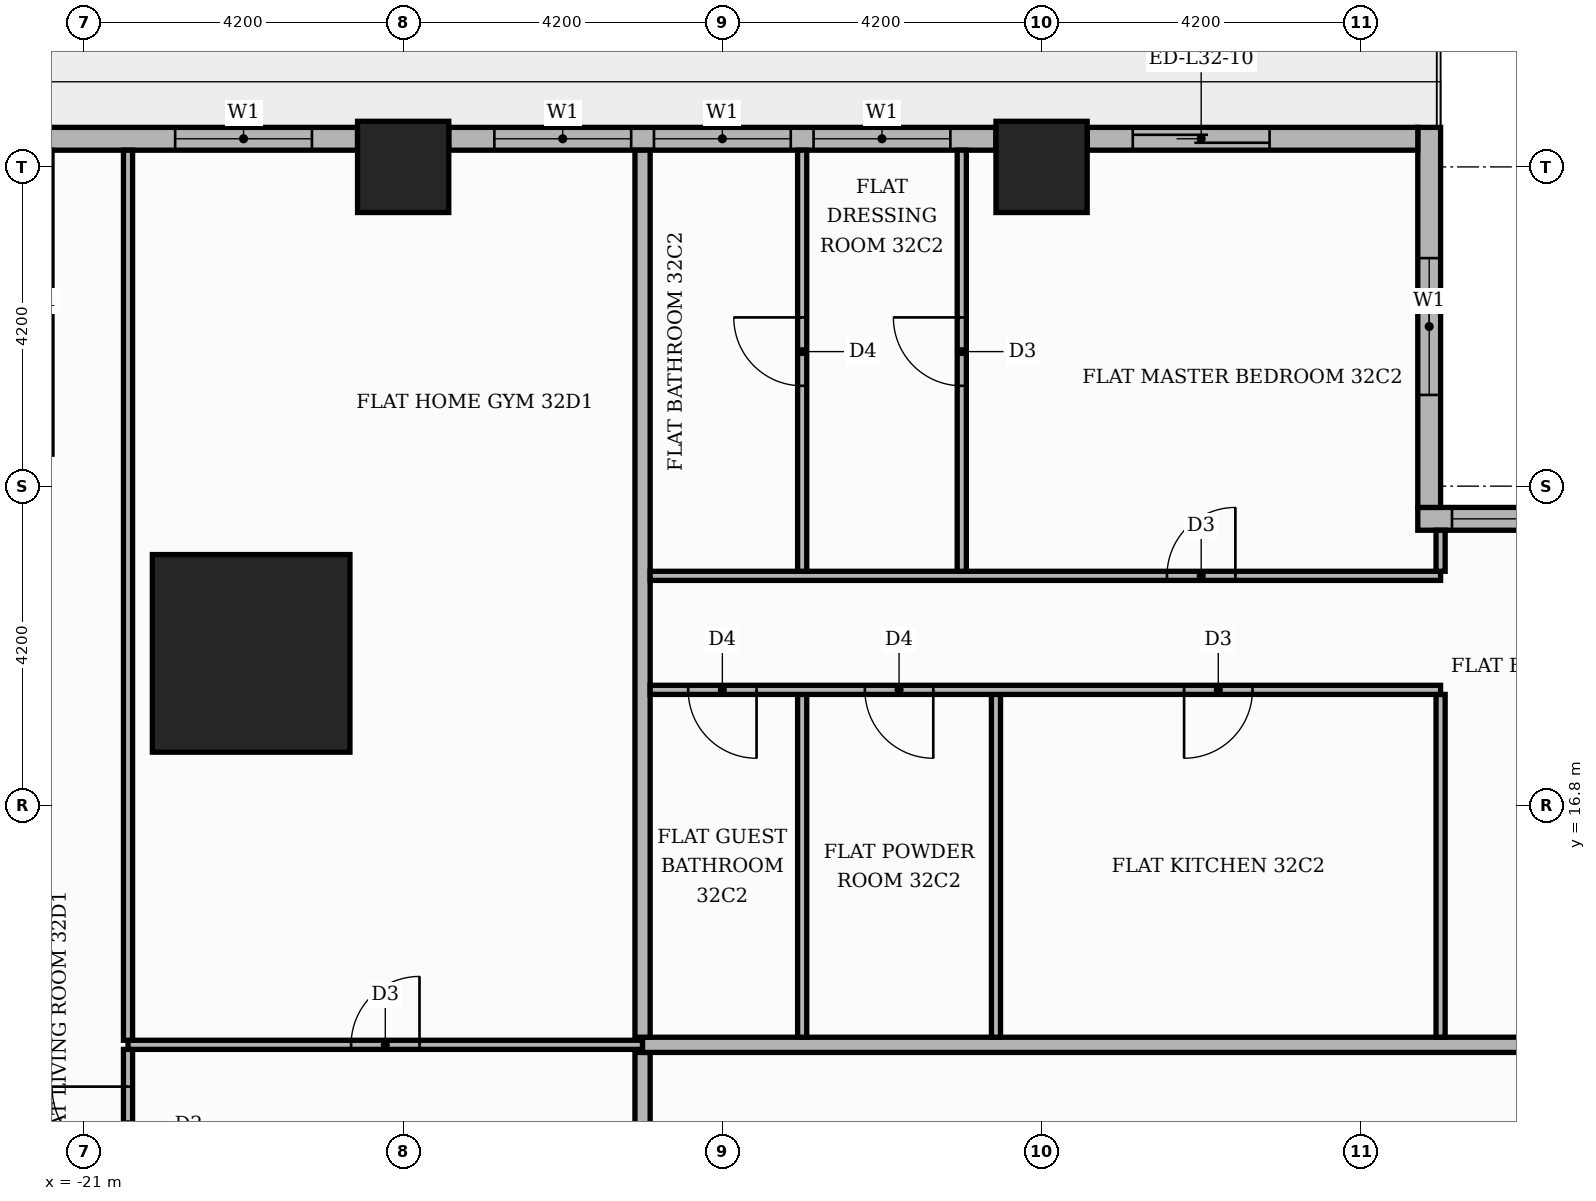
"""IFC4 building model, lengths in metres.
Left out: names, types, materials, properties, quantities, classifications, styles, units other than length and angle.
Written with IfcOpenShell. Run it as: python <this file> out.ifc"""

import sys

from ifc_helpers import new_model, si_unit, direction, frame, frame_2d, origin, origin_2d, place, context, subcontext, project, spatial, rectangle, extrude, element, fill, save


model = new_model("IFC4")
c1 = context("Model", 3, precision=1e-05, world=origin(), true_north=direction((0.0, 1.0)))
c2 = subcontext(c1, "Body", "Model", "MODEL_VIEW")
j1 = project(units=[si_unit("LENGTHUNIT", "METRE"), si_unit("PLANEANGLEUNIT", "RADIAN")], contexts=[c1])
p1 = place(None, origin())
s1 = spatial("IfcSite", under=j1, at=p1, CompositionType="ELEMENT")
p2 = place(p1, origin())
s2 = spatial("IfcBuilding", under=s1, at=p2, CompositionType="ELEMENT")
p3 = place(p2, frame((0.0, 0.0, 137.7)))
s3 = spatial("IfcBuildingStorey", under=s2, at=p3, CompositionType="ELEMENT", Elevation=137.7)
p4 = place(p3, frame((-18.8, 18.8, 0.0), z_axis=(0.0, 0.0, 1.0), x_axis=(1.0, 0.0, 0.0)))
e1 = element("IfcColumn", 1, at=p4, inside=s3, PredefinedType="COLUMN", context=c2, shape_type="SweptSolid", body=[
    extrude(rectangle(XDim=2.6, YDim=2.6, at=origin_2d()), origin(), (0.0, 0.0, 1.0), 3.9),
])
for number, where, z_axis, x_axis in (
    (2, (-8.4, 25.2, 0.0), (0.0, 0.0, 1.0), (1.0, 0.0, 0.0)),
    (3, (-16.8, 25.2, 0.0), (0.0, 0.0, 1.0), (1.0, 0.0, 0.0)),
):
    element("IfcColumn", number, at=place(p3, frame(where, z_axis=z_axis, x_axis=x_axis)), inside=s3, PredefinedType="COLUMN", context=c2, shape_type="SweptSolid", body=[
        extrude(rectangle(XDim=1.2, YDim=1.2, at=origin_2d()), origin(), (0.0, 0.0, 1.0), 3.9),
    ])
p5 = place(p3, frame((3.15, 20.57, 0.0), z_axis=(0.0, 0.0, 1.0), x_axis=(-1.0, 0.0, 0.0)))
e4 = element("IfcWall", 4, at=p5, inside=s3, PredefinedType="STANDARD", context=c2, shape_type="SweptSolid", body=[
    extrude(rectangle(XDim=6.6, YDim=0.3, at=frame_2d((3.3, 0.0))), origin(), (0.0, 0.0, 1.0), 3.48),
])
p6 = place(p5, frame((0.15, 0.0, 0.9)))
e5 = element("IfcOpeningElement", 5, at=p6, cuts=e4, PredefinedType="OPENING", context=c2, shape_type="SweptSolid", body=[
    extrude(rectangle(XDim=6.0, YDim=2.1, at=frame_2d((3.0, 1.05))), frame((0.0, 0.16, 0.0), z_axis=(0.0, -1.0, 0.0), x_axis=(1.0, 0.0, 0.0)), (0.0, 0.0, 1.0), 0.32),
])
p7 = place(p3, frame((-3.3, 20.72, 0.0), z_axis=(0.0, 0.0, 1.0), x_axis=(0.0, 1.0, 0.0)))
e6 = element("IfcWall", 6, at=p7, inside=s3, PredefinedType="STANDARD", context=c2, shape_type="SweptSolid", body=[
    extrude(rectangle(XDim=5.0, YDim=0.3, at=frame_2d((2.5, 0.0))), origin(), (0.0, 0.0, 1.0), 3.48),
])
p8 = place(p7, frame((1.48, 0.0, 0.9)))
e7 = element("IfcOpeningElement", 7, at=p8, cuts=e6, PredefinedType="OPENING", context=c2, shape_type="SweptSolid", body=[
    extrude(rectangle(XDim=1.8, YDim=2.1, at=frame_2d((0.9, 1.05))), frame((0.0, 0.16, 0.0), z_axis=(0.0, -1.0, 0.0), x_axis=(1.0, 0.0, 0.0)), (0.0, 0.0, 1.0), 0.32),
])
p9 = place(p3, frame((-3.45, 25.57, 0.0), z_axis=(0.0, 0.0, 1.0), x_axis=(-1.0, 0.0, 0.0)))
e8 = element("IfcWall", 8, at=p9, inside=s3, PredefinedType="STANDARD", context=c2, shape_type="SweptSolid", body=[
    extrude(rectangle(XDim=4.35, YDim=0.3, at=frame_2d((2.175, 0.0))), origin(), (0.0, 0.0, 1.0), 3.48),
])
p10 = place(p9, frame((1.95, 0.0, 0.0)))
e9 = element("IfcOpeningElement", 9, at=p10, cuts=e8, PredefinedType="OPENING", context=c2, shape_type="SweptSolid", body=[
    extrude(rectangle(XDim=1.8, YDim=2.4, at=frame_2d((0.9, 1.2))), frame((0.0, 0.16, 0.0), z_axis=(0.0, -1.0, 0.0), x_axis=(1.0, 0.0, 0.0)), (0.0, 0.0, 1.0), 0.32),
])
p11 = place(p3, frame((-9.0, 25.57, 0.0), z_axis=(0.0, 0.0, 1.0), x_axis=(-1.0, 0.0, 0.0)))
e10 = element("IfcWall", 10, at=p11, inside=s3, PredefinedType="STANDARD", context=c2, shape_type="SweptSolid", body=[
    extrude(rectangle(XDim=7.2, YDim=0.3, at=frame_2d((3.6, 0.0))), origin(), (0.0, 0.0, 1.0), 3.48),
])
p12 = place(p11, frame((0.6, 0.0, 0.9)))
e11 = element("IfcOpeningElement", 11, at=p12, cuts=e10, PredefinedType="OPENING", context=c2, shape_type="SweptSolid", body=[
    extrude(rectangle(XDim=1.8, YDim=2.1, at=frame_2d((0.9, 1.05))), frame((0.0, 0.16, 0.0), z_axis=(0.0, -1.0, 0.0), x_axis=(1.0, 0.0, 0.0)), (0.0, 0.0, 1.0), 0.32),
])
p13 = place(p11, frame((2.7, 0.0, 0.9)))
e12 = element("IfcOpeningElement", 12, at=p13, cuts=e10, PredefinedType="OPENING", context=c2, shape_type="SweptSolid", body=[
    extrude(rectangle(XDim=1.8, YDim=2.1, at=frame_2d((0.9, 1.05))), frame((0.0, 0.16, 0.0), z_axis=(0.0, -1.0, 0.0), x_axis=(1.0, 0.0, 0.0)), (0.0, 0.0, 1.0), 0.32),
])
p14 = place(p11, frame((4.8, 0.0, 0.9)))
e13 = element("IfcOpeningElement", 13, at=p14, cuts=e10, PredefinedType="OPENING", context=c2, shape_type="SweptSolid", body=[
    extrude(rectangle(XDim=1.8, YDim=2.1, at=frame_2d((0.9, 1.05))), frame((0.0, 0.16, 0.0), z_axis=(0.0, -1.0, 0.0), x_axis=(1.0, 0.0, 0.0)), (0.0, 0.0, 1.0), 0.32),
])
p15 = place(p3, frame((-17.4, 25.57, 0.0), z_axis=(0.0, 0.0, 1.0), x_axis=(-1.0, 0.0, 0.0)))
e14 = element("IfcWall", 14, at=p15, inside=s3, PredefinedType="STANDARD", context=c2, shape_type="SweptSolid", body=[
    extrude(rectangle(XDim=4.32, YDim=0.3, at=frame_2d((2.16, 0.0))), origin(), (0.0, 0.0, 1.0), 3.48),
])
p16 = place(p15, frame((0.6, 0.0, 0.9)))
e15 = element("IfcOpeningElement", 15, at=p16, cuts=e14, PredefinedType="OPENING", context=c2, shape_type="SweptSolid", body=[
    extrude(rectangle(XDim=1.8, YDim=2.1, at=frame_2d((0.9, 1.05))), frame((0.0, 0.16, 0.0), z_axis=(0.0, -1.0, 0.0), x_axis=(1.0, 0.0, 0.0)), (0.0, 0.0, 1.0), 0.32),
])
p17 = place(p3, frame((-13.65, 11.1, 0.0), z_axis=(0.0, 0.0, 1.0), x_axis=(0.0, 1.0, 0.0)))
e16 = element("IfcWall", 16, at=p17, inside=s3, PredefinedType="PARTITIONING", context=c2, shape_type="SweptSolid", body=[
    extrude(rectangle(XDim=2.45, YDim=0.2, at=frame_2d((1.225, 0.0))), origin(), (0.0, 0.0, 1.0), 3.48),
])
p18 = place(p3, frame((-20.42, 11.61, 0.0), z_axis=(0.0, 0.0, 1.0), x_axis=(0.0, 1.0, 0.0)))
e17 = element("IfcWall", 17, at=p18, inside=s3, PredefinedType="PARTITIONING", context=c2, shape_type="SweptSolid", body=[
    extrude(rectangle(XDim=1.98, YDim=0.12, at=frame_2d((0.99, 0.0))), origin(), (0.0, 0.0, 1.0), 3.48),
])
p19 = place(p18, frame((0.49, 0.0, 0.0)))
e18 = element("IfcOpeningElement", 18, at=p19, cuts=e17, PredefinedType="OPENING", context=c2, shape_type="SweptSolid", body=[
    extrude(rectangle(XDim=1.0, YDim=2.1, at=frame_2d((0.5, 1.05))), frame((0.0, 0.07, 0.0), z_axis=(0.0, -1.0, 0.0), x_axis=(1.0, 0.0, 0.0)), (0.0, 0.0, 1.0), 0.14),
])
p20 = place(p3, frame((-20.42, 13.65, 0.0), z_axis=(0.0, 0.0, 1.0), x_axis=(1.0, 0.0, 0.0)))
e19 = element("IfcWall", 19, at=p20, inside=s3, PredefinedType="PARTITIONING", context=c2, shape_type="SweptSolid", body=[
    extrude(rectangle(XDim=6.77, YDim=0.12, at=frame_2d((3.385, 0.0))), origin(), (0.0, 0.0, 1.0), 3.48),
])
p21 = place(p20, frame((2.935, 0.0, 0.0)))
e20 = element("IfcOpeningElement", 20, at=p21, cuts=e19, PredefinedType="OPENING", context=c2, shape_type="SweptSolid", body=[
    extrude(rectangle(XDim=0.9, YDim=2.1, at=frame_2d((0.45, 1.05))), frame((0.0, 0.07, 0.0), z_axis=(0.0, -1.0, 0.0), x_axis=(1.0, 0.0, 0.0)), (0.0, 0.0, 1.0), 0.14),
])
p22 = place(p3, frame((-13.65, 13.65, 0.0), z_axis=(0.0, 0.0, 1.0), x_axis=(1.0, 0.0, 0.0)))
e21 = element("IfcWall", 21, at=p22, inside=s3, PredefinedType="PARTITIONING", context=c2, shape_type="SweptSolid", body=[
    extrude(rectangle(XDim=39.07, YDim=0.2, at=frame_2d((19.535, 0.0))), origin(), (0.0, 0.0, 1.0), 3.48),
])
p23 = place(p22, frame((24.65, 0.0, 0.0)))
e22 = element("IfcOpeningElement", 22, at=p23, cuts=e21, PredefinedType="OPENING", context=c2, shape_type="SweptSolid", body=[
    extrude(rectangle(XDim=1.1, YDim=2.4, at=frame_2d((0.55, 1.2))), frame((0.0, 0.11, 0.0), z_axis=(0.0, -1.0, 0.0), x_axis=(1.0, 0.0, 0.0)), (0.0, 0.0, 1.0), 0.22),
])
p24 = place(p22, frame((12.05, 0.0, 0.0)))
e23 = element("IfcOpeningElement", 23, at=p24, cuts=e21, PredefinedType="OPENING", context=c2, shape_type="SweptSolid", body=[
    extrude(rectangle(XDim=1.1, YDim=2.4, at=frame_2d((0.55, 1.2))), frame((0.0, 0.11, 0.0), z_axis=(0.0, -1.0, 0.0), x_axis=(1.0, 0.0, 0.0)), (0.0, 0.0, 1.0), 0.22),
])
p25 = place(p3, frame((-20.42, 13.71, 0.0), z_axis=(0.0, 0.0, 1.0), x_axis=(0.0, 1.0, 0.0)))
e24 = element("IfcWall", 24, at=p25, inside=s3, PredefinedType="PARTITIONING", context=c2, shape_type="SweptSolid", body=[
    extrude(rectangle(XDim=11.71, YDim=0.12, at=frame_2d((5.855, 0.0))), origin(), (0.0, 0.0, 1.0), 3.48),
])
p26 = place(p3, frame((-13.65, 13.75, 0.0), z_axis=(0.0, 0.0, 1.0), x_axis=(0.0, 1.0, 0.0)))
e25 = element("IfcWall", 25, at=p26, inside=s3, PredefinedType="PARTITIONING", context=c2, shape_type="SweptSolid", body=[
    extrude(rectangle(XDim=11.67, YDim=0.2, at=frame_2d((5.835, 0.0))), origin(), (0.0, 0.0, 1.0), 3.48),
])
for number, where, z_axis, x_axis in (
    (26, (-11.55, 13.75, 0.0), (0.0, 0.0, 1.0), (0.0, 1.0, 0.0)),
    (27, (-9.0, 13.75, 0.0), (0.0, 0.0, 1.0), (0.0, 1.0, 0.0)),
    (28, (-3.15, 13.75, 0.0), (0.0, 0.0, 1.0), (0.0, 1.0, 0.0)),
):
    element("IfcWall", number, at=place(p3, frame(where, z_axis=z_axis, x_axis=x_axis)), inside=s3, PredefinedType="PARTITIONING", context=c2, shape_type="SweptSolid", body=[
        extrude(rectangle(XDim=4.51, YDim=0.12, at=frame_2d((2.255, 0.0))), origin(), (0.0, 0.0, 1.0), 3.48),
    ])
p27 = place(p3, frame((-13.55, 18.32, 0.0), z_axis=(0.0, 0.0, 1.0), x_axis=(1.0, 0.0, 0.0)))
e29 = element("IfcWall", 29, at=p27, inside=s3, PredefinedType="PARTITIONING", context=c2, shape_type="SweptSolid", body=[
    extrude(rectangle(XDim=10.4, YDim=0.12, at=frame_2d((5.2, 0.0))), origin(), (0.0, 0.0, 1.0), 3.48),
])
p28 = place(p27, frame((7.025, 0.0, 0.0)))
e30 = element("IfcOpeningElement", 30, at=p28, cuts=e29, PredefinedType="OPENING", context=c2, shape_type="SweptSolid", body=[
    extrude(rectangle(XDim=0.9, YDim=2.1, at=frame_2d((0.45, 1.05))), frame((0.0, 0.07, 0.0), z_axis=(0.0, -1.0, 0.0), x_axis=(1.0, 0.0, 0.0)), (0.0, 0.0, 1.0), 0.14),
])
p29 = place(p27, frame((2.825, 0.0, 0.0)))
e31 = element("IfcOpeningElement", 31, at=p29, cuts=e29, PredefinedType="OPENING", context=c2, shape_type="SweptSolid", body=[
    extrude(rectangle(XDim=0.9, YDim=2.1, at=frame_2d((0.45, 1.05))), frame((0.0, 0.07, 0.0), z_axis=(0.0, -1.0, 0.0), x_axis=(1.0, 0.0, 0.0)), (0.0, 0.0, 1.0), 0.14),
])
p30 = place(p27, frame((0.5, 0.0, 0.0)))
e32 = element("IfcOpeningElement", 32, at=p30, cuts=e29, PredefinedType="OPENING", context=c2, shape_type="SweptSolid", body=[
    extrude(rectangle(XDim=0.9, YDim=2.1, at=frame_2d((0.45, 1.05))), frame((0.0, 0.07, 0.0), z_axis=(0.0, -1.0, 0.0), x_axis=(1.0, 0.0, 0.0)), (0.0, 0.0, 1.0), 0.14),
])
p31 = place(p3, frame((-13.55, 19.82, 0.0), z_axis=(0.0, 0.0, 1.0), x_axis=(1.0, 0.0, 0.0)))
e33 = element("IfcWall", 33, at=p31, inside=s3, PredefinedType="PARTITIONING", context=c2, shape_type="SweptSolid", body=[
    extrude(rectangle(XDim=10.4, YDim=0.12, at=frame_2d((5.2, 0.0))), origin(), (0.0, 0.0, 1.0), 3.48),
])
p32 = place(p31, frame((6.8, 0.0, 0.0)))
e34 = element("IfcOpeningElement", 34, at=p32, cuts=e33, PredefinedType="OPENING", context=c2, shape_type="SweptSolid", body=[
    extrude(rectangle(XDim=0.9, YDim=2.1, at=frame_2d((0.45, 1.05))), frame((0.0, 0.07, 0.0), z_axis=(0.0, -1.0, 0.0), x_axis=(1.0, 0.0, 0.0)), (0.0, 0.0, 1.0), 0.14),
])
p33 = place(p3, frame((-11.55, 19.88, 0.0), z_axis=(0.0, 0.0, 1.0), x_axis=(0.0, 1.0, 0.0)))
e35 = element("IfcWall", 35, at=p33, inside=s3, PredefinedType="PARTITIONING", context=c2, shape_type="SweptSolid", body=[
    extrude(rectangle(XDim=5.54, YDim=0.12, at=frame_2d((2.77, 0.0))), origin(), (0.0, 0.0, 1.0), 3.48),
])
p34 = place(p33, frame((2.44, 0.0, 0.0)))
e36 = element("IfcOpeningElement", 36, at=p34, cuts=e35, PredefinedType="OPENING", context=c2, shape_type="SweptSolid", body=[
    extrude(rectangle(XDim=0.9, YDim=2.1, at=frame_2d((0.45, 1.05))), frame((0.0, 0.07, 0.0), z_axis=(0.0, -1.0, 0.0), x_axis=(1.0, 0.0, 0.0)), (0.0, 0.0, 1.0), 0.14),
])
p35 = place(p3, frame((-9.45, 19.88, 0.0), z_axis=(0.0, 0.0, 1.0), x_axis=(0.0, 1.0, 0.0)))
e37 = element("IfcWall", 37, at=p35, inside=s3, PredefinedType="PARTITIONING", context=c2, shape_type="SweptSolid", body=[
    extrude(rectangle(XDim=5.54, YDim=0.12, at=frame_2d((2.77, 0.0))), origin(), (0.0, 0.0, 1.0), 3.48),
])
p36 = place(p35, frame((2.44, 0.0, 0.0)))
e38 = element("IfcOpeningElement", 38, at=p36, cuts=e37, PredefinedType="OPENING", context=c2, shape_type="SweptSolid", body=[
    extrude(rectangle(XDim=0.9, YDim=2.1, at=frame_2d((0.45, 1.05))), frame((0.0, 0.07, 0.0), z_axis=(0.0, -1.0, 0.0), x_axis=(1.0, 0.0, 0.0)), (0.0, 0.0, 1.0), 0.14),
])
p37 = place(p3, frame((-3.15, 19.88, 0.0), z_axis=(0.0, 0.0, 1.0), x_axis=(0.0, 1.0, 0.0)))
e39 = element("IfcWall", 39, at=p37, inside=s3, PredefinedType="PARTITIONING", context=c2, shape_type="SweptSolid", body=[
    extrude(rectangle(XDim=0.54, YDim=0.12, at=frame_2d((0.27, 0.0))), origin(), (0.0, 0.0, 1.0), 3.48),
])
p38 = place(p6, origin())
e40 = element("IfcWindow", 40, at=p38, inside=s3, PartitioningType="SINGLE_PANEL", PredefinedType="WINDOW", context=c2, shape_type="SweptSolid", body=[
    extrude(rectangle(XDim=6.0, YDim=2.1, at=frame_2d((3.0, 1.05))), frame((0.0, 0.03, 0.0), z_axis=(0.0, -1.0, 0.0), x_axis=(1.0, 0.0, 0.0)), (0.0, 0.0, 1.0), 0.06),
])
fill(e5, e40)
p39 = place(p8, origin())
e41 = element("IfcWindow", 41, at=p39, inside=s3, PartitioningType="SINGLE_PANEL", PredefinedType="WINDOW", context=c2, shape_type="SweptSolid", body=[
    extrude(rectangle(XDim=1.8, YDim=2.1, at=frame_2d((0.9, 1.05))), frame((0.0, 0.03, 0.0), z_axis=(0.0, -1.0, 0.0), x_axis=(1.0, 0.0, 0.0)), (0.0, 0.0, 1.0), 0.06),
])
fill(e7, e41)
p40 = place(p10, origin())
e42 = element("IfcDoor", 42, at=p40, inside=s3, OperationType="SLIDING_TO_RIGHT", PredefinedType="DOOR", context=c2, shape_type="SweptSolid", body=[
    extrude(rectangle(XDim=1.8, YDim=2.4, at=frame_2d((0.9, 1.2))), frame((0.0, 0.025, 0.0), z_axis=(0.0, -1.0, 0.0), x_axis=(1.0, 0.0, 0.0)), (0.0, 0.0, 1.0), 0.05),
])
fill(e9, e42)
p41 = place(p12, origin())
e43 = element("IfcWindow", 43, at=p41, inside=s3, PartitioningType="SINGLE_PANEL", PredefinedType="WINDOW", context=c2, shape_type="SweptSolid", body=[
    extrude(rectangle(XDim=1.8, YDim=2.1, at=frame_2d((0.9, 1.05))), frame((0.0, 0.03, 0.0), z_axis=(0.0, -1.0, 0.0), x_axis=(1.0, 0.0, 0.0)), (0.0, 0.0, 1.0), 0.06),
])
fill(e11, e43)
p42 = place(p13, origin())
e44 = element("IfcWindow", 44, at=p42, inside=s3, PartitioningType="SINGLE_PANEL", PredefinedType="WINDOW", context=c2, shape_type="SweptSolid", body=[
    extrude(rectangle(XDim=1.8, YDim=2.1, at=frame_2d((0.9, 1.05))), frame((0.0, 0.03, 0.0), z_axis=(0.0, -1.0, 0.0), x_axis=(1.0, 0.0, 0.0)), (0.0, 0.0, 1.0), 0.06),
])
fill(e12, e44)
p43 = place(p14, origin())
e45 = element("IfcWindow", 45, at=p43, inside=s3, PartitioningType="SINGLE_PANEL", PredefinedType="WINDOW", context=c2, shape_type="SweptSolid", body=[
    extrude(rectangle(XDim=1.8, YDim=2.1, at=frame_2d((0.9, 1.05))), frame((0.0, 0.03, 0.0), z_axis=(0.0, -1.0, 0.0), x_axis=(1.0, 0.0, 0.0)), (0.0, 0.0, 1.0), 0.06),
])
fill(e13, e45)
p44 = place(p16, origin())
e46 = element("IfcWindow", 46, at=p44, inside=s3, PartitioningType="SINGLE_PANEL", PredefinedType="WINDOW", context=c2, shape_type="SweptSolid", body=[
    extrude(rectangle(XDim=1.8, YDim=2.1, at=frame_2d((0.9, 1.05))), frame((0.0, 0.03, 0.0), z_axis=(0.0, -1.0, 0.0), x_axis=(1.0, 0.0, 0.0)), (0.0, 0.0, 1.0), 0.06),
])
fill(e15, e46)
p45 = place(p28, frame((0.9, 0.0, 0.0), z_axis=(0.0, 0.0, 1.0), x_axis=(-1.0, 0.0, 0.0)))
e47 = element("IfcDoor", 47, at=p45, inside=s3, OperationType="SINGLE_SWING_LEFT", PredefinedType="DOOR", context=c2, shape_type="SweptSolid", body=[
    extrude(rectangle(XDim=0.9, YDim=2.1, at=frame_2d((0.45, 1.05))), frame((0.0, 0.025, 0.0), z_axis=(0.0, -1.0, 0.0), x_axis=(1.0, 0.0, 0.0)), (0.0, 0.0, 1.0), 0.05),
])
fill(e30, e47)
p46 = place(p29, frame((0.9, 0.0, 0.0), z_axis=(0.0, 0.0, 1.0), x_axis=(-1.0, 0.0, 0.0)))
e48 = element("IfcDoor", 48, at=p46, inside=s3, OperationType="SINGLE_SWING_RIGHT", PredefinedType="DOOR", context=c2, shape_type="SweptSolid", body=[
    extrude(rectangle(XDim=0.9, YDim=2.1, at=frame_2d((0.45, 1.05))), frame((0.0, 0.025, 0.0), z_axis=(0.0, -1.0, 0.0), x_axis=(1.0, 0.0, 0.0)), (0.0, 0.0, 1.0), 0.05),
])
fill(e31, e48)
p47 = place(p30, frame((0.9, 0.0, 0.0), z_axis=(0.0, 0.0, 1.0), x_axis=(-1.0, 0.0, 0.0)))
e49 = element("IfcDoor", 49, at=p47, inside=s3, OperationType="SINGLE_SWING_RIGHT", PredefinedType="DOOR", context=c2, shape_type="SweptSolid", body=[
    extrude(rectangle(XDim=0.9, YDim=2.1, at=frame_2d((0.45, 1.05))), frame((0.0, 0.025, 0.0), z_axis=(0.0, -1.0, 0.0), x_axis=(1.0, 0.0, 0.0)), (0.0, 0.0, 1.0), 0.05),
])
fill(e32, e49)
p48 = place(p32, origin())
e50 = element("IfcDoor", 50, at=p48, inside=s3, OperationType="SINGLE_SWING_RIGHT", PredefinedType="DOOR", context=c2, shape_type="SweptSolid", body=[
    extrude(rectangle(XDim=0.9, YDim=2.1, at=frame_2d((0.45, 1.05))), frame((0.0, 0.025, 0.0), z_axis=(0.0, -1.0, 0.0), x_axis=(1.0, 0.0, 0.0)), (0.0, 0.0, 1.0), 0.05),
])
fill(e34, e50)
p49 = place(p36, origin())
e51 = element("IfcDoor", 51, at=p49, inside=s3, OperationType="SINGLE_SWING_RIGHT", PredefinedType="DOOR", context=c2, shape_type="SweptSolid", body=[
    extrude(rectangle(XDim=0.9, YDim=2.1, at=frame_2d((0.45, 1.05))), frame((0.0, 0.025, 0.0), z_axis=(0.0, -1.0, 0.0), x_axis=(1.0, 0.0, 0.0)), (0.0, 0.0, 1.0), 0.05),
])
fill(e38, e51)
p50 = place(p34, origin())
e52 = element("IfcDoor", 52, at=p50, inside=s3, OperationType="SINGLE_SWING_RIGHT", PredefinedType="DOOR", context=c2, shape_type="SweptSolid", body=[
    extrude(rectangle(XDim=0.9, YDim=2.1, at=frame_2d((0.45, 1.05))), frame((0.0, 0.025, 0.0), z_axis=(0.0, -1.0, 0.0), x_axis=(1.0, 0.0, 0.0)), (0.0, 0.0, 1.0), 0.05),
])
fill(e36, e52)
p51 = place(p21, origin())
e53 = element("IfcDoor", 53, at=p51, inside=s3, OperationType="SINGLE_SWING_RIGHT", PredefinedType="DOOR", context=c2, shape_type="SweptSolid", body=[
    extrude(rectangle(XDim=0.9, YDim=2.1, at=frame_2d((0.45, 1.05))), frame((0.0, 0.025, 0.0), z_axis=(0.0, -1.0, 0.0), x_axis=(1.0, 0.0, 0.0)), (0.0, 0.0, 1.0), 0.05),
])
fill(e20, e53)
p52 = place(p19, origin())
e54 = element("IfcDoor", 54, at=p52, inside=s3, OperationType="SINGLE_SWING_RIGHT", PredefinedType="DOOR", context=c2, shape_type="SweptSolid", body=[
    extrude(rectangle(XDim=1.0, YDim=2.1, at=frame_2d((0.5, 1.05))), frame((0.0, 0.025, 0.0), z_axis=(0.0, -1.0, 0.0), x_axis=(1.0, 0.0, 0.0)), (0.0, 0.0, 1.0), 0.05),
])
fill(e18, e54)
save(model, sys.argv[1])
